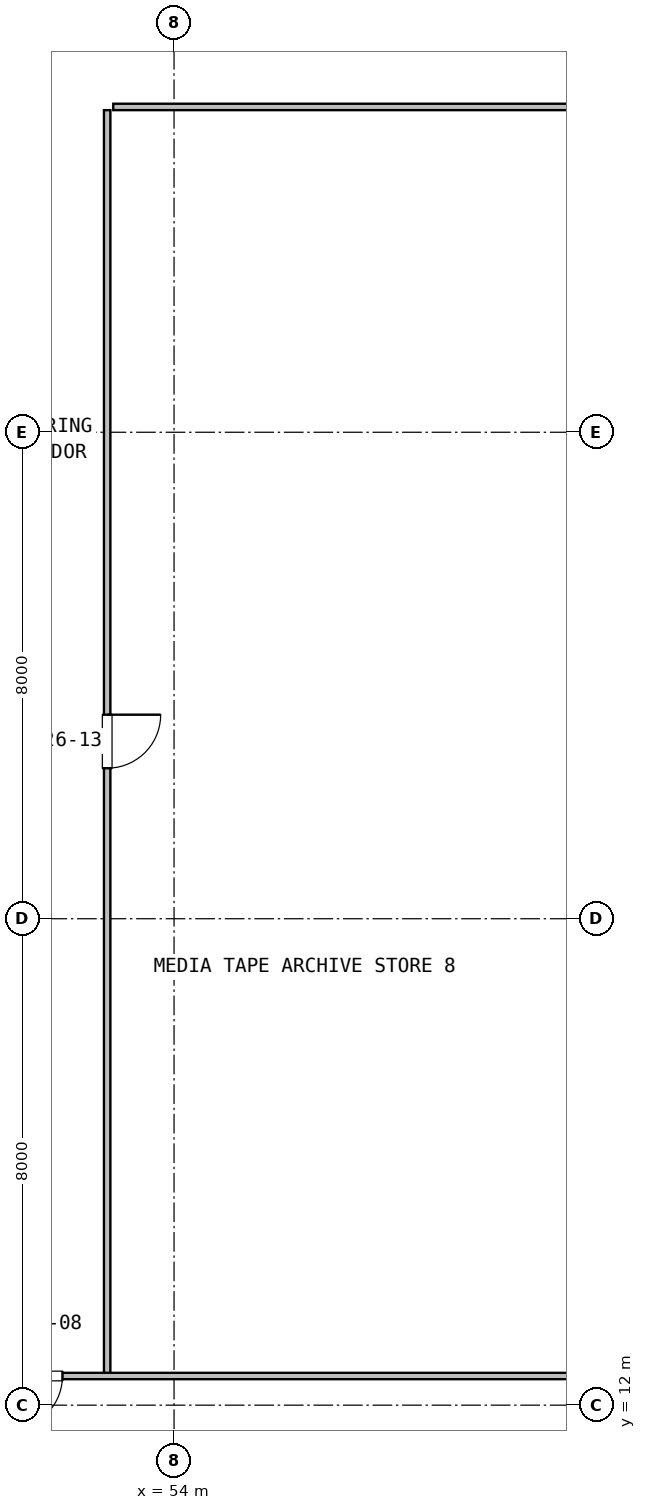
"""IFC4 building model, lengths in metres.
Left out: names, types, materials, properties, quantities, classifications, styles, units other than length and angle.
Written with IfcOpenShell. Run it as: python <this file> out.ifc"""

import sys

from ifc_helpers import new_model, si_unit, direction, frame, frame_2d, origin, place, context, subcontext, project, spatial, rectangle, extrude, source, transform, mapped, element, fill, save


model = new_model("IFC4")
c1 = context("Model", 3, precision=1e-05, world=origin(), true_north=direction((0.0, 1.0)))
c2 = subcontext(c1, "Body", "Model", "MODEL_VIEW")
j1 = project(units=[si_unit("LENGTHUNIT", "METRE"), si_unit("PLANEANGLEUNIT", "RADIAN")], contexts=[c1])
p1 = place(None, origin())
s1 = spatial("IfcSite", under=j1, at=p1, CompositionType="ELEMENT")
p2 = place(p1, origin())
s2 = spatial("IfcBuilding", under=s1, at=p2, CompositionType="ELEMENT")
p3 = place(p2, frame((0.0, 0.0, 110.6)))
s3 = spatial("IfcBuildingStorey", under=s2, at=p3, CompositionType="ELEMENT", Elevation=110.6)
p4 = place(p3, frame((4.68, 12.48, 0.0), z_axis=(0.0, 0.0, 1.0), x_axis=(1.0, 0.0, 0.0)))
e1 = element("IfcWall", 1, at=p4, inside=s3, PredefinedType="PARTITIONING", context=c2, shape_type="SweptSolid", body=[
    extrude(rectangle(XDim=58.64, YDim=0.105, at=frame_2d((29.32, 0.0))), origin(), (0.0, 0.0, 1.0), 2.83),
])
p5 = place(p4, frame((13.155, 0.0, 0.0)))
e2 = element("IfcOpeningElement", 2, at=p5, cuts=e1, PredefinedType="OPENING", context=c2, shape_type="SweptSolid", body=[
    extrude(rectangle(XDim=0.88, YDim=2.06, at=frame_2d((0.44, 1.03))), frame((0.0, 0.062, 0.0), z_axis=(0.0, -1.0, 0.0), x_axis=(1.0, 0.0, 0.0)), (0.0, 0.0, 1.0), 0.125),
])
p6 = place(p4, frame((29.88, 0.0, 0.0)))
e3 = element("IfcOpeningElement", 3, at=p6, cuts=e1, PredefinedType="OPENING", context=c2, shape_type="SweptSolid", body=[
    extrude(rectangle(XDim=0.88, YDim=2.06, at=frame_2d((0.44, 1.03))), frame((0.0, 0.062, 0.0), z_axis=(0.0, -1.0, 0.0), x_axis=(1.0, 0.0, 0.0)), (0.0, 0.0, 1.0), 0.125),
])
p7 = place(p4, frame((46.605, 0.0, 0.0)))
e4 = element("IfcOpeningElement", 4, at=p7, cuts=e1, PredefinedType="OPENING", context=c2, shape_type="SweptSolid", body=[
    extrude(rectangle(XDim=0.88, YDim=2.06, at=frame_2d((0.44, 1.03))), frame((0.0, 0.062, 0.0), z_axis=(0.0, -1.0, 0.0), x_axis=(1.0, 0.0, 0.0)), (0.0, 0.0, 1.0), 0.125),
])
p8 = place(p3, frame((53.0, 33.35, 0.0), z_axis=(0.0, 0.0, 1.0), x_axis=(1.0, 0.0, 0.0)))
e5 = element("IfcWall", 5, at=p8, inside=s3, PredefinedType="PARTITIONING", context=c2, shape_type="SweptSolid", body=[
    extrude(rectangle(XDim=10.32, YDim=0.105, at=frame_2d((5.16, 0.0))), origin(), (0.0, 0.0, 1.0), 3.108),
])
p9 = place(p3, frame((52.9, 12.533, 0.0), z_axis=(0.0, 0.0, 1.0), x_axis=(0.0, 1.0, 0.0)))
e6 = element("IfcWall", 6, at=p9, inside=s3, PredefinedType="PARTITIONING", context=c2, shape_type="SweptSolid", body=[
    extrude(rectangle(XDim=20.764, YDim=0.105, at=frame_2d((10.382, 0.0))), origin(), (0.0, 0.0, 1.0), 3.222),
])
p10 = place(p9, frame((9.942, 0.0, 0.0)))
e7 = element("IfcOpeningElement", 7, at=p10, cuts=e6, PredefinedType="OPENING", context=c2, shape_type="SweptSolid", body=[
    extrude(rectangle(XDim=0.88, YDim=2.06, at=frame_2d((0.44, 1.03))), frame((0.0, 0.062, 0.0), z_axis=(0.0, -1.0, 0.0), x_axis=(1.0, 0.0, 0.0)), (0.0, 0.0, 1.0), 0.125),
])
m1 = source(origin(), c2, "Body", "SweptSolid", [
    extrude(rectangle(XDim=0.88, YDim=2.06, at=frame_2d((0.44, 1.03))), frame((0.0, 0.025, 0.0), z_axis=(0.0, -1.0, 0.0), x_axis=(1.0, 0.0, 0.0)), (0.0, 0.0, 1.0), 0.05),
])
p11 = place(p7, frame((0.88, 0.0, 0.0), z_axis=(0.0, 0.0, 1.0), x_axis=(-1.0, 0.0, 0.0)))
e8 = element("IfcDoor", 8, at=p11, inside=s3, OperationType="SINGLE_SWING_LEFT", PredefinedType="DOOR", context=c2, shape_type="MappedRepresentation", body=[
    mapped(m1, transform((0.0, 0.0, 0.0), x_axis=(1.0, 0.0, 0.0), y_axis=(0.0, 1.0, 0.0), z_axis=(0.0, 0.0, 1.0), scale=1.0)),
])
fill(e4, e8)
p12 = place(p10, frame((0.88, 0.0, 0.0), z_axis=(0.0, 0.0, 1.0), x_axis=(-1.0, 0.0, 0.0)))
e9 = element("IfcDoor", 9, at=p12, inside=s3, OperationType="SINGLE_SWING_RIGHT", PredefinedType="DOOR", context=c2, shape_type="MappedRepresentation", body=[
    mapped(m1, transform((0.0, 0.0, 0.0), x_axis=(1.0, 0.0, 0.0), y_axis=(0.0, 1.0, 0.0), z_axis=(0.0, 0.0, 1.0), scale=1.0)),
])
fill(e7, e9)
save(model, sys.argv[1])
